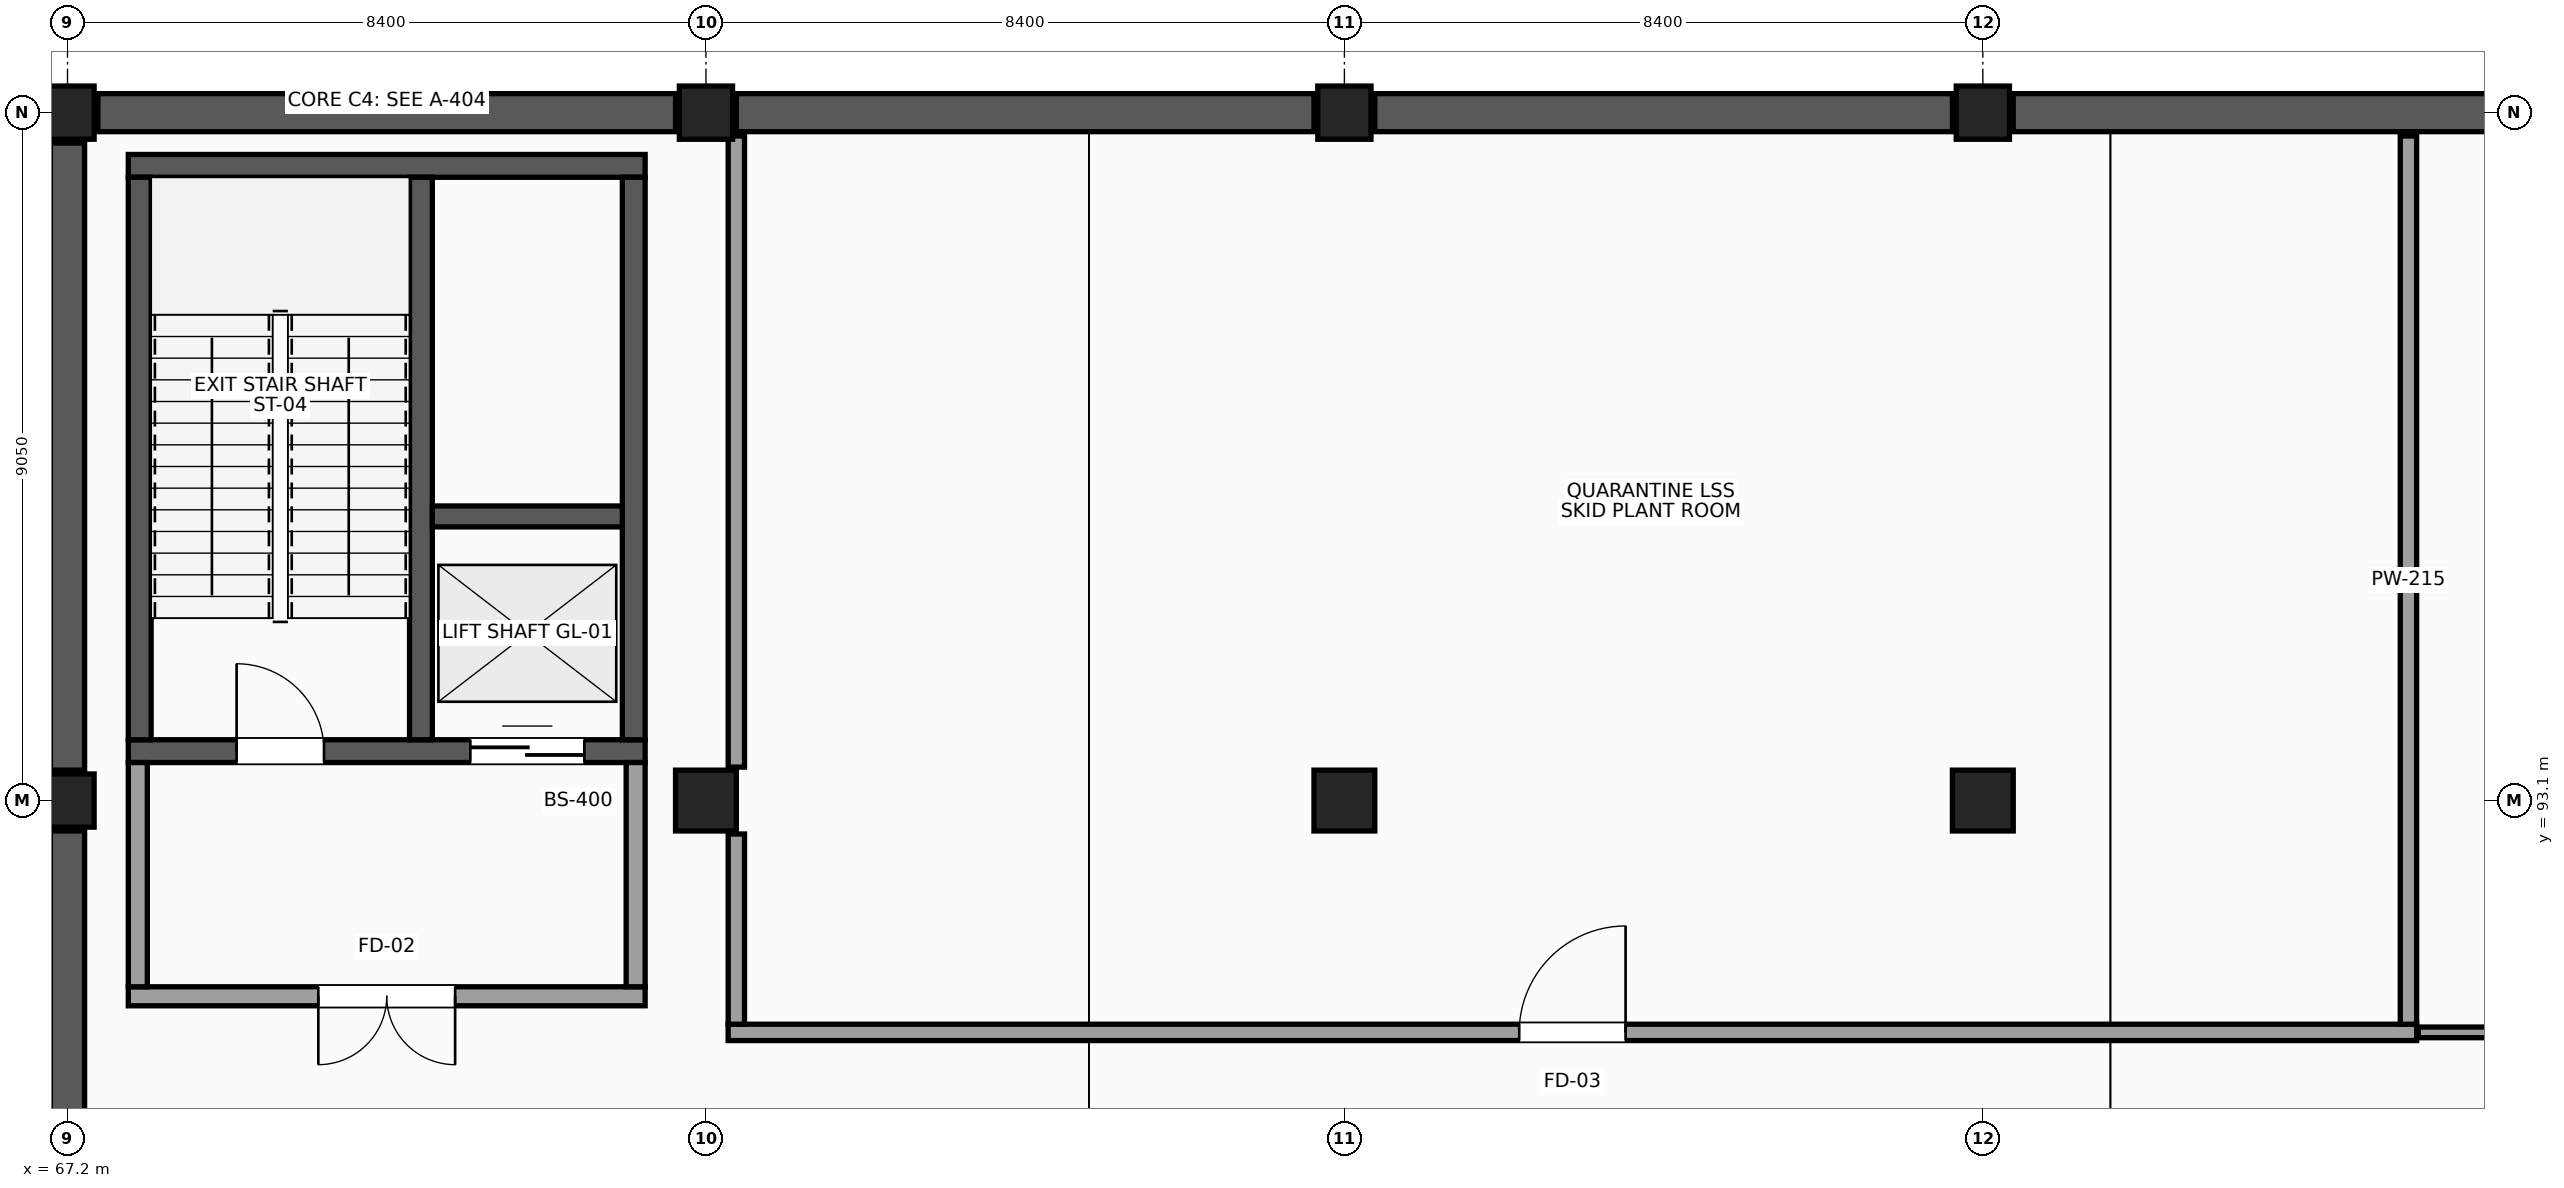
"""IFC4 building model, lengths in metres.
Left out: names, types, materials, properties, quantities, classifications, styles, units other than length and angle.
Written with IfcOpenShell. Run it as: python <this file> out.ifc"""

import sys

from ifc_helpers import new_model, si_unit, direction, frame, frame_2d, origin, origin_2d, place, context, subcontext, project, spatial, rectangle, extrude, element, fill, save


model = new_model("IFC4")
c1 = context("Model", 3, precision=1e-05, world=origin(), true_north=direction((0.0, 1.0)))
c2 = subcontext(c1, "Body", "Model", "MODEL_VIEW")
j1 = project(units=[si_unit("LENGTHUNIT", "METRE"), si_unit("PLANEANGLEUNIT", "RADIAN")], contexts=[c1])
p1 = place(None, origin())
s1 = spatial("IfcSite", under=j1, at=p1, CompositionType="ELEMENT")
p2 = place(p1, origin())
s2 = spatial("IfcBuilding", under=s1, at=p2, CompositionType="ELEMENT")
p3 = place(p2, frame((0.0, 0.0, -5.4)))
s3 = spatial("IfcBuildingStorey", under=s2, at=p3, CompositionType="ELEMENT", Elevation=-5.4)
for number, where, z_axis, x_axis in (
    (1, (67.2, 93.1, -0.4), (0.0, 0.0, 1.0), (1.0, 0.0, 0.0)),
    (2, (67.2, 102.15, -0.4), (0.0, 0.0, 1.0), (1.0, 0.0, 0.0)),
):
    element("IfcColumn", number, at=place(p3, frame(where, z_axis=z_axis, x_axis=x_axis)), inside=s3, PredefinedType="COLUMN", context=c2, shape_type="SweptSolid", body=[
        extrude(rectangle(XDim=0.7, YDim=0.7, at=origin_2d()), origin(), (0.0, 0.0, 1.0), 5.8),
    ])
p4 = place(p3, frame((75.6, 93.1, -0.4), z_axis=(0.0, 0.0, 1.0), x_axis=(1.0, 0.0, 0.0)))
e3 = element("IfcColumn", 3, at=p4, inside=s3, PredefinedType="COLUMN", context=c2, shape_type="SweptSolid", body=[
    extrude(rectangle(XDim=0.8, YDim=0.8, at=origin_2d()), origin(), (0.0, 0.0, 1.0), 5.8),
])
p5 = place(p3, frame((75.6, 102.15, -0.4), z_axis=(0.0, 0.0, 1.0), x_axis=(1.0, 0.0, 0.0)))
e4 = element("IfcColumn", 4, at=p5, inside=s3, PredefinedType="COLUMN", context=c2, shape_type="SweptSolid", body=[
    extrude(rectangle(XDim=0.7, YDim=0.7, at=origin_2d()), origin(), (0.0, 0.0, 1.0), 5.8),
])
p6 = place(p3, frame((84.0, 93.1, -0.4), z_axis=(0.0, 0.0, 1.0), x_axis=(1.0, 0.0, 0.0)))
e5 = element("IfcColumn", 5, at=p6, inside=s3, PredefinedType="COLUMN", context=c2, shape_type="SweptSolid", body=[
    extrude(rectangle(XDim=0.8, YDim=0.8, at=origin_2d()), origin(), (0.0, 0.0, 1.0), 5.8),
])
p7 = place(p3, frame((84.0, 102.15, -0.4), z_axis=(0.0, 0.0, 1.0), x_axis=(1.0, 0.0, 0.0)))
e6 = element("IfcColumn", 6, at=p7, inside=s3, PredefinedType="COLUMN", context=c2, shape_type="SweptSolid", body=[
    extrude(rectangle(XDim=0.7, YDim=0.7, at=origin_2d()), origin(), (0.0, 0.0, 1.0), 5.8),
])
p8 = place(p3, frame((92.4, 93.1, -0.4), z_axis=(0.0, 0.0, 1.0), x_axis=(1.0, 0.0, 0.0)))
e7 = element("IfcColumn", 7, at=p8, inside=s3, PredefinedType="COLUMN", context=c2, shape_type="SweptSolid", body=[
    extrude(rectangle(XDim=0.8, YDim=0.8, at=origin_2d()), origin(), (0.0, 0.0, 1.0), 5.8),
])
p9 = place(p3, frame((92.4, 102.15, -0.4), z_axis=(0.0, 0.0, 1.0), x_axis=(1.0, 0.0, 0.0)))
e8 = element("IfcColumn", 8, at=p9, inside=s3, PredefinedType="COLUMN", context=c2, shape_type="SweptSolid", body=[
    extrude(rectangle(XDim=0.7, YDim=0.7, at=origin_2d()), origin(), (0.0, 0.0, 1.0), 5.8),
])
for number, where, z_axis, x_axis in (
    (9, (67.2, 84.45, 0.0), (0.0, 0.0, 1.0), (0.0, 1.0, 0.0)),
    (10, (67.2, 93.5, 0.0), (0.0, 0.0, 1.0), (0.0, 1.0, 0.0)),
):
    element("IfcWall", number, at=place(p3, frame(where, z_axis=z_axis, x_axis=x_axis)), inside=s3, PredefinedType="USERDEFINED", context=c2, shape_type="SweptSolid", body=[
        extrude(rectangle(XDim=8.25, YDim=0.45, at=frame_2d((4.125, 0.0))), origin(), (0.0, 0.0, 1.0), 5.08),
    ])
p10 = place(p3, frame((67.6, 102.15, 0.0), z_axis=(0.0, 0.0, 1.0), x_axis=(1.0, 0.0, 0.0)))
e11 = element("IfcWall", 11, at=p10, inside=s3, PredefinedType="USERDEFINED", context=c2, shape_type="SweptSolid", body=[
    extrude(rectangle(XDim=7.6, YDim=0.5, at=frame_2d((3.8, 0.0))), origin(), (0.0, 0.0, 1.0), 5.08),
])
for number, where, z_axis, x_axis in (
    (12, (76.0, 102.15, 0.0), (0.0, 0.0, 1.0), (1.0, 0.0, 0.0)),
    (13, (84.4, 102.15, 0.0), (0.0, 0.0, 1.0), (1.0, 0.0, 0.0)),
):
    element("IfcWall", number, at=place(p3, frame(where, z_axis=z_axis, x_axis=x_axis)), inside=s3, PredefinedType="USERDEFINED", context=c2, shape_type="SweptSolid", body=[
        extrude(rectangle(XDim=7.6, YDim=0.5, at=frame_2d((3.8, 0.0))), origin(), (0.0, 0.0, 1.0), 5.08),
    ])
p11 = place(p3, frame((92.8, 102.15, 0.0), z_axis=(0.0, 0.0, 1.0), x_axis=(1.0, 0.0, 0.0)))
e14 = element("IfcWall", 14, at=p11, inside=s3, PredefinedType="USERDEFINED", context=c2, shape_type="SweptSolid", body=[
    extrude(rectangle(XDim=7.6, YDim=0.5, at=frame_2d((3.8, 0.0))), origin(), (0.0, 0.0, 1.0), 5.08),
])
p12 = place(p3, frame((68.0, 93.75, 0.0), z_axis=(0.0, 0.0, 1.0), x_axis=(1.0, 0.0, 0.0)))
e15 = element("IfcWall", 15, at=p12, inside=s3, PredefinedType="SHEAR", context=c2, shape_type="SweptSolid", body=[
    extrude(rectangle(XDim=6.8, YDim=0.3, at=frame_2d((3.4, 0.0))), origin(), (0.0, 0.0, 1.0), 5.08),
])
p13 = place(p12, frame((1.425, 0.0, 0.0)))
e16 = element("IfcOpeningElement", 16, at=p13, cuts=e15, PredefinedType="OPENING", context=c2, shape_type="SweptSolid", body=[
    extrude(rectangle(XDim=1.15, YDim=2.2, at=frame_2d((0.575, 1.1))), frame((0.0, 0.16, 0.0), z_axis=(0.0, -1.0, 0.0), x_axis=(1.0, 0.0, 0.0)), (0.0, 0.0, 1.0), 0.32),
])
p14 = place(p12, frame((4.5, 0.0, 0.0)))
e17 = element("IfcOpeningElement", 17, at=p14, cuts=e15, PredefinedType="OPENING", context=c2, shape_type="SweptSolid", body=[
    extrude(rectangle(XDim=1.5, YDim=2.3, at=frame_2d((0.75, 1.15))), frame((0.0, 0.16, 0.0), z_axis=(0.0, -1.0, 0.0), x_axis=(1.0, 0.0, 0.0)), (0.0, 0.0, 1.0), 0.32),
])
p15 = place(p3, frame((68.0, 101.45, 0.0), z_axis=(0.0, 0.0, 1.0), x_axis=(1.0, 0.0, 0.0)))
e18 = element("IfcWall", 18, at=p15, inside=s3, PredefinedType="SHEAR", context=c2, shape_type="SweptSolid", body=[
    extrude(rectangle(XDim=6.8, YDim=0.3, at=frame_2d((3.4, 0.0))), origin(), (0.0, 0.0, 1.0), 5.08),
])
for number, where, z_axis, x_axis in (
    (19, (68.15, 93.9, 0.0), (0.0, 0.0, 1.0), (0.0, 1.0, 0.0)),
    (20, (74.65, 93.9, 0.0), (0.0, 0.0, 1.0), (0.0, 1.0, 0.0)),
    (21, (71.85, 93.9, 0.0), (0.0, 0.0, 1.0), (0.0, 1.0, 0.0)),
):
    element("IfcWall", number, at=place(p3, frame(where, z_axis=z_axis, x_axis=x_axis)), inside=s3, PredefinedType="SHEAR", context=c2, shape_type="SweptSolid", body=[
        extrude(rectangle(XDim=7.4, YDim=0.3, at=frame_2d((3.7, 0.0))), origin(), (0.0, 0.0, 1.0), 5.08),
    ])
p16 = place(p3, frame((72.0, 96.838, 0.0), z_axis=(0.0, 0.0, 1.0), x_axis=(1.0, 0.0, 0.0)))
e22 = element("IfcWall", 22, at=p16, inside=s3, PredefinedType="SHEAR", context=c2, shape_type="SweptSolid", body=[
    extrude(rectangle(XDim=2.5, YDim=0.275, at=frame_2d((1.25, 0.0))), origin(), (0.0, 0.0, 1.0), 5.08),
])
p17 = place(p3, frame((68.0, 90.525, 0.0), z_axis=(0.0, 0.0, 1.0), x_axis=(1.0, 0.0, 0.0)))
e23 = element("IfcWall", 23, at=p17, inside=s3, PredefinedType="PARTITIONING", context=c2, shape_type="SweptSolid", body=[
    extrude(rectangle(XDim=6.8, YDim=0.25, at=frame_2d((3.4, 0.0))), origin(), (0.0, 0.0, 1.0), 5.08),
])
p18 = place(p17, frame((2.5, 0.0, 0.0)))
e24 = element("IfcOpeningElement", 24, at=p18, cuts=e23, PredefinedType="OPENING", context=c2, shape_type="SweptSolid", body=[
    extrude(rectangle(XDim=1.8, YDim=2.25, at=frame_2d((0.9, 1.125))), frame((0.0, 0.135, 0.0), z_axis=(0.0, -1.0, 0.0), x_axis=(1.0, 0.0, 0.0)), (0.0, 0.0, 1.0), 0.27),
])
for number, where, z_axis, x_axis in (
    (25, (68.125, 90.65, 0.0), (0.0, 0.0, 1.0), (0.0, 1.0, 0.0)),
    (26, (74.675, 90.65, 0.0), (0.0, 0.0, 1.0), (0.0, 1.0, 0.0)),
):
    element("IfcWall", number, at=place(p3, frame(where, z_axis=z_axis, x_axis=x_axis)), inside=s3, PredefinedType="PARTITIONING", context=c2, shape_type="SweptSolid", body=[
        extrude(rectangle(XDim=2.95, YDim=0.25, at=frame_2d((1.475, 0.0))), origin(), (0.0, 0.0, 1.0), 4.23),
    ])
p19 = place(p3, frame((75.892, 90.05, 0.0), z_axis=(0.0, 0.0, 1.0), x_axis=(1.0, 0.0, 0.0)))
e27 = element("IfcWall", 27, at=p19, inside=s3, PredefinedType="PARTITIONING", context=c2, shape_type="SweptSolid", body=[
    extrude(rectangle(XDim=22.216, YDim=0.215, at=frame_2d((11.108, 0.0))), origin(), (0.0, 0.0, 1.0), 4.13),
])
p20 = place(p19, frame((10.408, 0.0, 0.0)))
e28 = element("IfcOpeningElement", 28, at=p20, cuts=e27, PredefinedType="OPENING", context=c2, shape_type="SweptSolid", body=[
    extrude(rectangle(XDim=1.4, YDim=2.25, at=frame_2d((0.7, 1.125))), frame((0.0, 0.118, 0.0), z_axis=(0.0, -1.0, 0.0), x_axis=(1.0, 0.0, 0.0)), (0.0, 0.0, 1.0), 0.235),
])
p21 = place(p3, frame((98.0, 90.157, 0.0), z_axis=(0.0, 0.0, 1.0), x_axis=(0.0, 1.0, 0.0)))
e29 = element("IfcWall", 29, at=p21, inside=s3, PredefinedType="PARTITIONING", context=c2, shape_type="SweptSolid", body=[
    extrude(rectangle(XDim=11.686, YDim=0.215, at=frame_2d((5.843, 0.0))), origin(), (0.0, 0.0, 1.0), 4.23),
])
p22 = place(p3, frame((76.0, 90.157, 0.0), z_axis=(0.0, 0.0, 1.0), x_axis=(0.0, 1.0, 0.0)))
e30 = element("IfcWall", 30, at=p22, inside=s3, PredefinedType="PARTITIONING", context=c2, shape_type="SweptSolid", body=[
    extrude(rectangle(XDim=2.503, YDim=0.215, at=frame_2d((1.251, 0.0))), origin(), (0.0, 0.0, 1.0), 4.53),
])
p23 = place(p3, frame((76.0, 93.54, 0.0), z_axis=(0.0, 0.0, 1.0), x_axis=(0.0, 1.0, 0.0)))
e31 = element("IfcWall", 31, at=p23, inside=s3, PredefinedType="PARTITIONING", context=c2, shape_type="SweptSolid", body=[
    extrude(rectangle(XDim=8.303, YDim=0.215, at=frame_2d((4.151, 0.0))), origin(), (0.0, 0.0, 1.0), 4.23),
])
p24 = place(p3, frame((98.13, 90.05, 0.0), z_axis=(0.0, 0.0, 1.0), x_axis=(1.0, 0.0, 0.0)))
e32 = element("IfcWall", 32, at=p24, inside=s3, PredefinedType="PARTITIONING", context=c2, shape_type="SweptSolid", body=[
    extrude(rectangle(XDim=10.74, YDim=0.14, at=frame_2d((5.37, 0.0))), origin(), (0.0, 0.0, 1.0), 4.13),
])
p25 = place(p24, frame((4.67, 0.0, 0.0)))
e33 = element("IfcOpeningElement", 33, at=p25, cuts=e32, PredefinedType="OPENING", context=c2, shape_type="SweptSolid", body=[
    extrude(rectangle(XDim=1.4, YDim=2.25, at=frame_2d((0.7, 1.125))), frame((0.0, 0.08, 0.0), z_axis=(0.0, -1.0, 0.0), x_axis=(1.0, 0.0, 0.0)), (0.0, 0.0, 1.0), 0.16),
])
p26 = place(p13, origin())
e34 = element("IfcDoor", 34, at=p26, inside=s3, OperationType="SINGLE_SWING_LEFT", PredefinedType="DOOR", context=c2, shape_type="SweptSolid", body=[
    extrude(rectangle(XDim=1.15, YDim=2.2, at=frame_2d((0.575, 1.1))), frame((0.0, 0.025, 0.0), z_axis=(0.0, -1.0, 0.0), x_axis=(1.0, 0.0, 0.0)), (0.0, 0.0, 1.0), 0.05),
])
fill(e16, e34)
p27 = place(p14, origin())
e35 = element("IfcDoor", 35, at=p27, inside=s3, OperationType="DOUBLE_DOOR_SLIDING", PredefinedType="DOOR", context=c2, shape_type="SweptSolid", body=[
    extrude(rectangle(XDim=1.5, YDim=2.3, at=frame_2d((0.75, 1.15))), frame((0.0, 0.025, 0.0), z_axis=(0.0, -1.0, 0.0), x_axis=(1.0, 0.0, 0.0)), (0.0, 0.0, 1.0), 0.05),
])
fill(e17, e35)
p28 = place(p18, frame((1.8, 0.0, 0.0), z_axis=(0.0, 0.0, 1.0), x_axis=(-1.0, 0.0, 0.0)))
e36 = element("IfcDoor", 36, at=p28, inside=s3, OperationType="DOUBLE_DOOR_SINGLE_SWING", PredefinedType="DOOR", context=c2, shape_type="SweptSolid", body=[
    extrude(rectangle(XDim=1.8, YDim=2.25, at=frame_2d((0.9, 1.125))), frame((0.0, 0.025, 0.0), z_axis=(0.0, -1.0, 0.0), x_axis=(1.0, 0.0, 0.0)), (0.0, 0.0, 1.0), 0.05),
])
fill(e24, e36)
p29 = place(p20, origin())
e37 = element("IfcDoor", 37, at=p29, inside=s3, OperationType="SINGLE_SWING_RIGHT", PredefinedType="DOOR", context=c2, shape_type="SweptSolid", body=[
    extrude(rectangle(XDim=1.4, YDim=2.25, at=frame_2d((0.7, 1.125))), frame((0.0, 0.025, 0.0), z_axis=(0.0, -1.0, 0.0), x_axis=(1.0, 0.0, 0.0)), (0.0, 0.0, 1.0), 0.05),
])
fill(e28, e37)
save(model, sys.argv[1])
